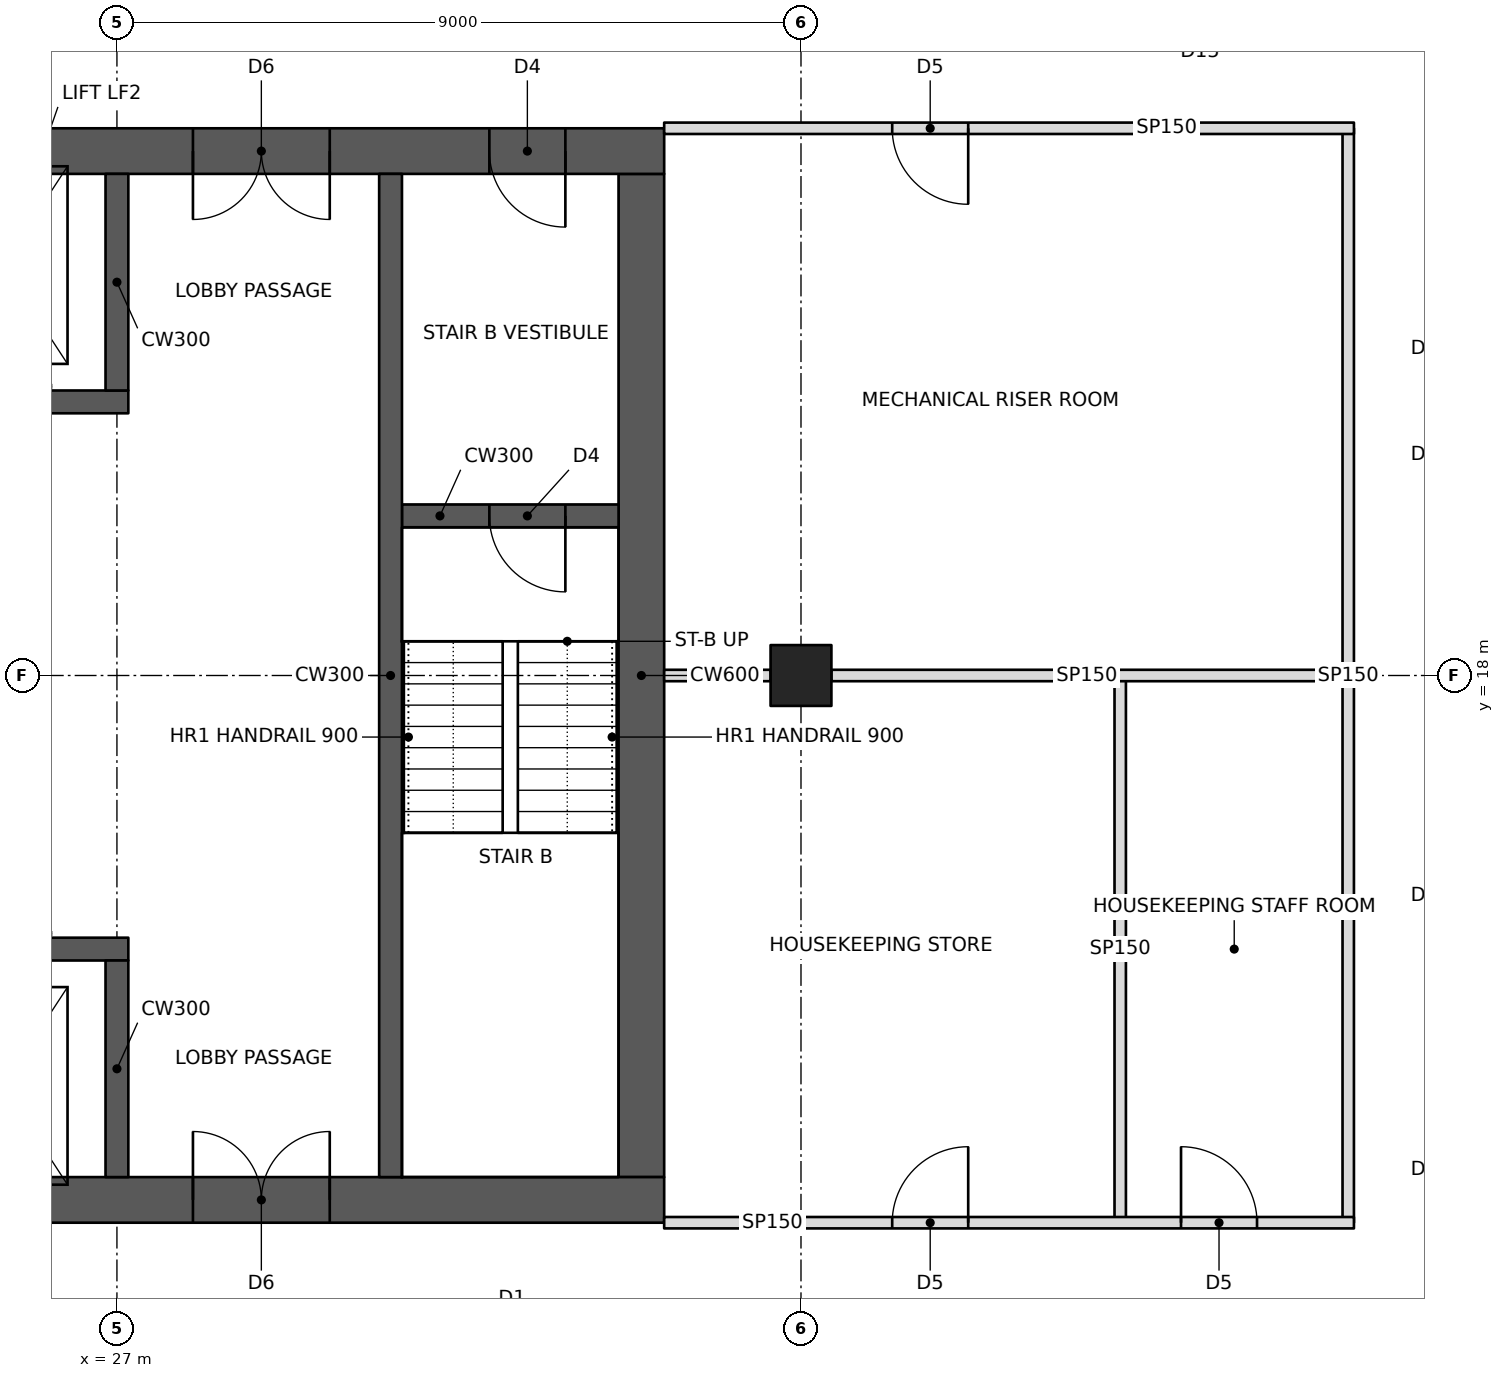
"""IFC4 building model, lengths in metres.
Left out: names, types, materials, properties, quantities, classifications, styles, units other than length and angle.
Written with IfcOpenShell. Run it as: python <this file> out.ifc"""

import sys

from ifc_helpers import new_model, si_unit, direction, frame, frame_2d, origin, origin_2d, place, context, subcontext, project, spatial, rectangle, hollow_rectangle, extrude, element, fill, save


model = new_model("IFC4")
c1 = context("Model", 3, precision=1e-05, world=origin(), true_north=direction((0.0, 1.0)))
c2 = subcontext(c1, "Body", "Model", "MODEL_VIEW")
j1 = project(units=[si_unit("LENGTHUNIT", "METRE"), si_unit("PLANEANGLEUNIT", "RADIAN")], contexts=[c1])
p1 = place(None, origin())
s1 = spatial("IfcSite", under=j1, at=p1, CompositionType="ELEMENT")
p2 = place(p1, origin())
s2 = spatial("IfcBuilding", under=s1, at=p2, CompositionType="ELEMENT")
p3 = place(p2, frame((0.0, 0.0, 51.8)))
s3 = spatial("IfcBuildingStorey", under=s2, at=p3, CompositionType="ELEMENT", Elevation=51.8)
p4 = place(p3, frame((36.0, 18.0, 0.0), z_axis=(0.0, 0.0, 1.0), x_axis=(0.0, 1.0, 0.0)))
e1 = element("IfcColumn", 1, at=p4, inside=s3, PredefinedType="COLUMN", context=c2, shape_type="SweptSolid", body=[
    extrude(hollow_rectangle(XDim=0.8, YDim=0.8, WallThickness=0.1, at=origin_2d()), origin(), (0.0, 0.0, 1.0), 3.4),
])
p5 = place(p3, frame((10.8, 11.1, 0.0), z_axis=(0.0, 0.0, 1.0), x_axis=(1.0, 0.0, 0.0)))
e2 = element("IfcWall", 2, at=p5, inside=s3, PredefinedType="SHEAR", context=c2, shape_type="SweptSolid", body=[
    extrude(rectangle(XDim=23.4, YDim=0.6, at=frame_2d((11.7, 0.0))), origin(), (0.0, 0.0, 1.0), 3.4),
])
p6 = place(p5, frame((1.0, 0.0, 0.0)))
e3 = element("IfcOpeningElement", 3, at=p6, cuts=e2, PredefinedType="OPENING", context=c2, shape_type="SweptSolid", body=[
    extrude(rectangle(XDim=1.0, YDim=2.1, at=frame_2d((0.5, 1.05))), frame((0.0, 0.31, 0.0), z_axis=(0.0, -1.0, 0.0), x_axis=(1.0, 0.0, 0.0)), (0.0, 0.0, 1.0), 0.62),
])
p7 = place(p5, frame((17.2, 0.0, 0.0)))
e4 = element("IfcOpeningElement", 4, at=p7, cuts=e2, PredefinedType="OPENING", context=c2, shape_type="SweptSolid", body=[
    extrude(rectangle(XDim=1.8, YDim=2.1, at=frame_2d((0.9, 1.05))), frame((0.0, 0.31, 0.0), z_axis=(0.0, -1.0, 0.0), x_axis=(1.0, 0.0, 0.0)), (0.0, 0.0, 1.0), 0.62),
])
p8 = place(p3, frame((10.8, 24.9, 0.0), z_axis=(0.0, 0.0, 1.0), x_axis=(1.0, 0.0, 0.0)))
e5 = element("IfcWall", 5, at=p8, inside=s3, PredefinedType="SHEAR", context=c2, shape_type="SweptSolid", body=[
    extrude(rectangle(XDim=23.4, YDim=0.6, at=frame_2d((11.7, 0.0))), origin(), (0.0, 0.0, 1.0), 3.4),
])
p9 = place(p8, frame((17.2, 0.0, 0.0)))
e6 = element("IfcOpeningElement", 6, at=p9, cuts=e5, PredefinedType="OPENING", context=c2, shape_type="SweptSolid", body=[
    extrude(rectangle(XDim=1.8, YDim=2.1, at=frame_2d((0.9, 1.05))), frame((0.0, 0.31, 0.0), z_axis=(0.0, -1.0, 0.0), x_axis=(1.0, 0.0, 0.0)), (0.0, 0.0, 1.0), 0.62),
])
p10 = place(p8, frame((21.1, 0.0, 0.0)))
e7 = element("IfcOpeningElement", 7, at=p10, cuts=e5, PredefinedType="OPENING", context=c2, shape_type="SweptSolid", body=[
    extrude(rectangle(XDim=1.0, YDim=2.1, at=frame_2d((0.5, 1.05))), frame((0.0, 0.31, 0.0), z_axis=(0.0, -1.0, 0.0), x_axis=(1.0, 0.0, 0.0)), (0.0, 0.0, 1.0), 0.62),
])
p11 = place(p3, frame((33.9, 11.4, 0.0), z_axis=(0.0, 0.0, 1.0), x_axis=(0.0, 1.0, 0.0)))
e8 = element("IfcWall", 8, at=p11, inside=s3, PredefinedType="SHEAR", context=c2, shape_type="SweptSolid", body=[
    extrude(rectangle(XDim=13.2, YDim=0.6, at=frame_2d((6.6, 0.0))), origin(), (0.0, 0.0, 1.0), 3.4),
])
p12 = place(p3, frame((18.15, 14.4, 0.0), z_axis=(0.0, 0.0, 1.0), x_axis=(1.0, 0.0, 0.0)))
e9 = element("IfcWall", 9, at=p12, inside=s3, PredefinedType="SHEAR", context=c2, shape_type="SweptSolid", body=[
    extrude(rectangle(XDim=9.0, YDim=0.3, at=frame_2d((4.5, 0.0))), origin(), (0.0, 0.0, 1.0), 3.4),
])
p13 = place(p12, frame((0.8, 0.0, 0.0)))
e10 = element("IfcOpeningElement", 10, at=p13, cuts=e9, PredefinedType="OPENING", context=c2, shape_type="SweptSolid", body=[
    extrude(rectangle(XDim=1.1, YDim=2.1, at=frame_2d((0.55, 1.05))), frame((0.0, 0.16, 0.0), z_axis=(0.0, -1.0, 0.0), x_axis=(1.0, 0.0, 0.0)), (0.0, 0.0, 1.0), 0.32),
])
p14 = place(p12, frame((3.8, 0.0, 0.0)))
e11 = element("IfcOpeningElement", 11, at=p14, cuts=e9, PredefinedType="OPENING", context=c2, shape_type="SweptSolid", body=[
    extrude(rectangle(XDim=1.1, YDim=2.1, at=frame_2d((0.55, 1.05))), frame((0.0, 0.16, 0.0), z_axis=(0.0, -1.0, 0.0), x_axis=(1.0, 0.0, 0.0)), (0.0, 0.0, 1.0), 0.32),
])
p15 = place(p12, frame((6.75, 0.0, 0.0)))
e12 = element("IfcOpeningElement", 12, at=p15, cuts=e9, PredefinedType="OPENING", context=c2, shape_type="SweptSolid", body=[
    extrude(rectangle(XDim=1.2, YDim=2.1, at=frame_2d((0.6, 1.05))), frame((0.0, 0.16, 0.0), z_axis=(0.0, -1.0, 0.0), x_axis=(1.0, 0.0, 0.0)), (0.0, 0.0, 1.0), 0.32),
])
p16 = place(p3, frame((27.0, 11.4, 0.0), z_axis=(0.0, 0.0, 1.0), x_axis=(0.0, 1.0, 0.0)))
e13 = element("IfcWall", 13, at=p16, inside=s3, PredefinedType="SHEAR", context=c2, shape_type="SweptSolid", body=[
    extrude(rectangle(XDim=2.85, YDim=0.3, at=frame_2d((1.425, 0.0))), origin(), (0.0, 0.0, 1.0), 3.4),
])
p17 = place(p3, frame((18.15, 21.6, 0.0), z_axis=(0.0, 0.0, 1.0), x_axis=(1.0, 0.0, 0.0)))
e14 = element("IfcWall", 14, at=p17, inside=s3, PredefinedType="SHEAR", context=c2, shape_type="SweptSolid", body=[
    extrude(rectangle(XDim=9.0, YDim=0.3, at=frame_2d((4.5, 0.0))), origin(), (0.0, 0.0, 1.0), 3.4),
])
p18 = place(p17, frame((6.75, 0.0, 0.0)))
e15 = element("IfcOpeningElement", 15, at=p18, cuts=e14, PredefinedType="OPENING", context=c2, shape_type="SweptSolid", body=[
    extrude(rectangle(XDim=1.2, YDim=2.1, at=frame_2d((0.6, 1.05))), frame((0.0, 0.16, 0.0), z_axis=(0.0, -1.0, 0.0), x_axis=(1.0, 0.0, 0.0)), (0.0, 0.0, 1.0), 0.32),
])
p19 = place(p3, frame((27.0, 21.75, 0.0), z_axis=(0.0, 0.0, 1.0), x_axis=(0.0, 1.0, 0.0)))
e16 = element("IfcWall", 16, at=p19, inside=s3, PredefinedType="SHEAR", context=c2, shape_type="SweptSolid", body=[
    extrude(rectangle(XDim=2.85, YDim=0.3, at=frame_2d((1.425, 0.0))), origin(), (0.0, 0.0, 1.0), 3.4),
])
p20 = place(p3, frame((30.6, 11.4, 0.0), z_axis=(0.0, 0.0, 1.0), x_axis=(0.0, 1.0, 0.0)))
e17 = element("IfcWall", 17, at=p20, inside=s3, PredefinedType="SHEAR", context=c2, shape_type="SweptSolid", body=[
    extrude(rectangle(XDim=13.2, YDim=0.3, at=frame_2d((6.6, 0.0))), origin(), (0.0, 0.0, 1.0), 3.4),
])
p21 = place(p3, frame((30.75, 20.1, 0.0), z_axis=(0.0, 0.0, 1.0), x_axis=(1.0, 0.0, 0.0)))
e18 = element("IfcWall", 18, at=p21, inside=s3, PredefinedType="SHEAR", context=c2, shape_type="SweptSolid", body=[
    extrude(rectangle(XDim=2.85, YDim=0.3, at=frame_2d((1.425, 0.0))), origin(), (0.0, 0.0, 1.0), 3.4),
])
p22 = place(p21, frame((1.15, 0.0, 0.0)))
e19 = element("IfcOpeningElement", 19, at=p22, cuts=e18, PredefinedType="OPENING", context=c2, shape_type="SweptSolid", body=[
    extrude(rectangle(XDim=1.0, YDim=2.1, at=frame_2d((0.5, 1.05))), frame((0.0, 0.16, 0.0), z_axis=(0.0, -1.0, 0.0), x_axis=(1.0, 0.0, 0.0)), (0.0, 0.0, 1.0), 0.32),
])
p23 = place(p3, frame((34.2, 10.8, 0.0), z_axis=(0.0, 0.0, 1.0), x_axis=(1.0, 0.0, 0.0)))
e20 = element("IfcWall", 20, at=p23, inside=s3, PredefinedType="PARTITIONING", context=c2, shape_type="SweptSolid", body=[
    extrude(rectangle(XDim=9.075, YDim=0.15, at=frame_2d((4.538, 0.0))), origin(), (0.0, 0.0, 1.0), 2.404),
])
p24 = place(p23, frame((6.8, 0.0, 0.0)))
e21 = element("IfcOpeningElement", 21, at=p24, cuts=e20, PredefinedType="OPENING", context=c2, shape_type="SweptSolid", body=[
    extrude(rectangle(XDim=1.0, YDim=2.1, at=frame_2d((0.5, 1.05))), frame((0.0, 0.085, 0.0), z_axis=(0.0, -1.0, 0.0), x_axis=(1.0, 0.0, 0.0)), (0.0, 0.0, 1.0), 0.17),
])
p25 = place(p23, frame((3.0, 0.0, 0.0)))
e22 = element("IfcOpeningElement", 22, at=p25, cuts=e20, PredefinedType="OPENING", context=c2, shape_type="SweptSolid", body=[
    extrude(rectangle(XDim=1.0, YDim=2.1, at=frame_2d((0.5, 1.05))), frame((0.0, 0.085, 0.0), z_axis=(0.0, -1.0, 0.0), x_axis=(1.0, 0.0, 0.0)), (0.0, 0.0, 1.0), 0.17),
])
p26 = place(p3, frame((34.2, 25.2, 0.0), z_axis=(0.0, 0.0, 1.0), x_axis=(1.0, 0.0, 0.0)))
e23 = element("IfcWall", 23, at=p26, inside=s3, PredefinedType="PARTITIONING", context=c2, shape_type="SweptSolid", body=[
    extrude(rectangle(XDim=9.075, YDim=0.15, at=frame_2d((4.538, 0.0))), origin(), (0.0, 0.0, 1.0), 2.404),
])
p27 = place(p26, frame((3.0, 0.0, 0.0)))
e24 = element("IfcOpeningElement", 24, at=p27, cuts=e23, PredefinedType="OPENING", context=c2, shape_type="SweptSolid", body=[
    extrude(rectangle(XDim=1.0, YDim=2.1, at=frame_2d((0.5, 1.05))), frame((0.0, 0.085, 0.0), z_axis=(0.0, -1.0, 0.0), x_axis=(1.0, 0.0, 0.0)), (0.0, 0.0, 1.0), 0.17),
])
p28 = place(p3, frame((43.2, 10.8, 0.0), z_axis=(0.0, 0.0, 1.0), x_axis=(0.0, 1.0, 0.0)))
e25 = element("IfcWall", 25, at=p28, inside=s3, PredefinedType="PARTITIONING", context=c2, shape_type="SweptSolid", body=[
    extrude(rectangle(XDim=14.4, YDim=0.15, at=frame_2d((7.2, 0.0))), origin(), (0.0, 0.0, 1.0), 2.404),
])
p29 = place(p3, frame((34.2, 18.0, 0.0), z_axis=(0.0, 0.0, 1.0), x_axis=(1.0, 0.0, 0.0)))
e26 = element("IfcWall", 26, at=p29, inside=s3, PredefinedType="PARTITIONING", context=c2, shape_type="SweptSolid", body=[
    extrude(rectangle(XDim=1.4, YDim=0.15, at=frame_2d((0.7, 0.0))), origin(), (0.0, 0.0, 1.0), 3.2),
])
p30 = place(p3, frame((36.4, 18.0, 0.0), z_axis=(0.0, 0.0, 1.0), x_axis=(1.0, 0.0, 0.0)))
e27 = element("IfcWall", 27, at=p30, inside=s3, PredefinedType="PARTITIONING", context=c2, shape_type="SweptSolid", body=[
    extrude(rectangle(XDim=6.725, YDim=0.15, at=frame_2d((3.363, 0.0))), origin(), (0.0, 0.0, 1.0), 2.405),
])
p31 = place(p3, frame((40.2, 10.8, 0.0), z_axis=(0.0, 0.0, 1.0), x_axis=(0.0, 1.0, 0.0)))
e28 = element("IfcWall", 28, at=p31, inside=s3, PredefinedType="PARTITIONING", context=c2, shape_type="SweptSolid", body=[
    extrude(rectangle(XDim=7.2, YDim=0.15, at=frame_2d((3.6, 0.0))), origin(), (0.0, 0.0, 1.0), 2.404),
])
p32 = place(p24, origin())
e29 = element("IfcDoor", 29, at=p32, inside=s3, OperationType="SINGLE_SWING_LEFT", PredefinedType="DOOR", context=c2, shape_type="SweptSolid", body=[
    extrude(rectangle(XDim=1.0, YDim=2.1, at=frame_2d((0.5, 1.05))), frame((0.0, 0.025, 0.0), z_axis=(0.0, -1.0, 0.0), x_axis=(1.0, 0.0, 0.0)), (0.0, 0.0, 1.0), 0.05),
])
fill(e21, e29)
p33 = place(p25, origin())
e30 = element("IfcDoor", 30, at=p33, inside=s3, OperationType="SINGLE_SWING_RIGHT", PredefinedType="DOOR", context=c2, shape_type="SweptSolid", body=[
    extrude(rectangle(XDim=1.0, YDim=2.1, at=frame_2d((0.5, 1.05))), frame((0.0, 0.025, 0.0), z_axis=(0.0, -1.0, 0.0), x_axis=(1.0, 0.0, 0.0)), (0.0, 0.0, 1.0), 0.05),
])
fill(e22, e30)
p34 = place(p27, frame((1.0, 0.0, 0.0), z_axis=(0.0, 0.0, 1.0), x_axis=(-1.0, 0.0, 0.0)))
e31 = element("IfcDoor", 31, at=p34, inside=s3, OperationType="SINGLE_SWING_LEFT", PredefinedType="DOOR", context=c2, shape_type="SweptSolid", body=[
    extrude(rectangle(XDim=1.0, YDim=2.1, at=frame_2d((0.5, 1.05))), frame((0.0, 0.025, 0.0), z_axis=(0.0, -1.0, 0.0), x_axis=(1.0, 0.0, 0.0)), (0.0, 0.0, 1.0), 0.05),
])
fill(e24, e31)
p35 = place(p7, origin())
e32 = element("IfcDoor", 32, at=p35, inside=s3, OperationType="DOUBLE_DOOR_SINGLE_SWING", PredefinedType="DOOR", context=c2, shape_type="SweptSolid", body=[
    extrude(rectangle(XDim=1.8, YDim=2.1, at=frame_2d((0.9, 1.05))), frame((0.0, 0.025, 0.0), z_axis=(0.0, -1.0, 0.0), x_axis=(1.0, 0.0, 0.0)), (0.0, 0.0, 1.0), 0.05),
])
fill(e4, e32)
p36 = place(p9, frame((1.8, 0.0, 0.0), z_axis=(0.0, 0.0, 1.0), x_axis=(-1.0, 0.0, 0.0)))
e33 = element("IfcDoor", 33, at=p36, inside=s3, OperationType="DOUBLE_DOOR_SINGLE_SWING", PredefinedType="DOOR", context=c2, shape_type="SweptSolid", body=[
    extrude(rectangle(XDim=1.8, YDim=2.1, at=frame_2d((0.9, 1.05))), frame((0.0, 0.025, 0.0), z_axis=(0.0, -1.0, 0.0), x_axis=(1.0, 0.0, 0.0)), (0.0, 0.0, 1.0), 0.05),
])
fill(e6, e33)
p37 = place(p10, frame((1.0, 0.0, 0.0), z_axis=(0.0, 0.0, 1.0), x_axis=(-1.0, 0.0, 0.0)))
e34 = element("IfcDoor", 34, at=p37, inside=s3, OperationType="SINGLE_SWING_LEFT", PredefinedType="DOOR", context=c2, shape_type="SweptSolid", body=[
    extrude(rectangle(XDim=1.0, YDim=2.1, at=frame_2d((0.5, 1.05))), frame((0.0, 0.025, 0.0), z_axis=(0.0, -1.0, 0.0), x_axis=(1.0, 0.0, 0.0)), (0.0, 0.0, 1.0), 0.05),
])
fill(e7, e34)
p38 = place(p22, frame((1.0, 0.0, 0.0), z_axis=(0.0, 0.0, 1.0), x_axis=(-1.0, 0.0, 0.0)))
e35 = element("IfcDoor", 35, at=p38, inside=s3, OperationType="SINGLE_SWING_LEFT", PredefinedType="DOOR", context=c2, shape_type="SweptSolid", body=[
    extrude(rectangle(XDim=1.0, YDim=2.1, at=frame_2d((0.5, 1.05))), frame((0.0, 0.025, 0.0), z_axis=(0.0, -1.0, 0.0), x_axis=(1.0, 0.0, 0.0)), (0.0, 0.0, 1.0), 0.05),
])
fill(e19, e35)
save(model, sys.argv[1])
